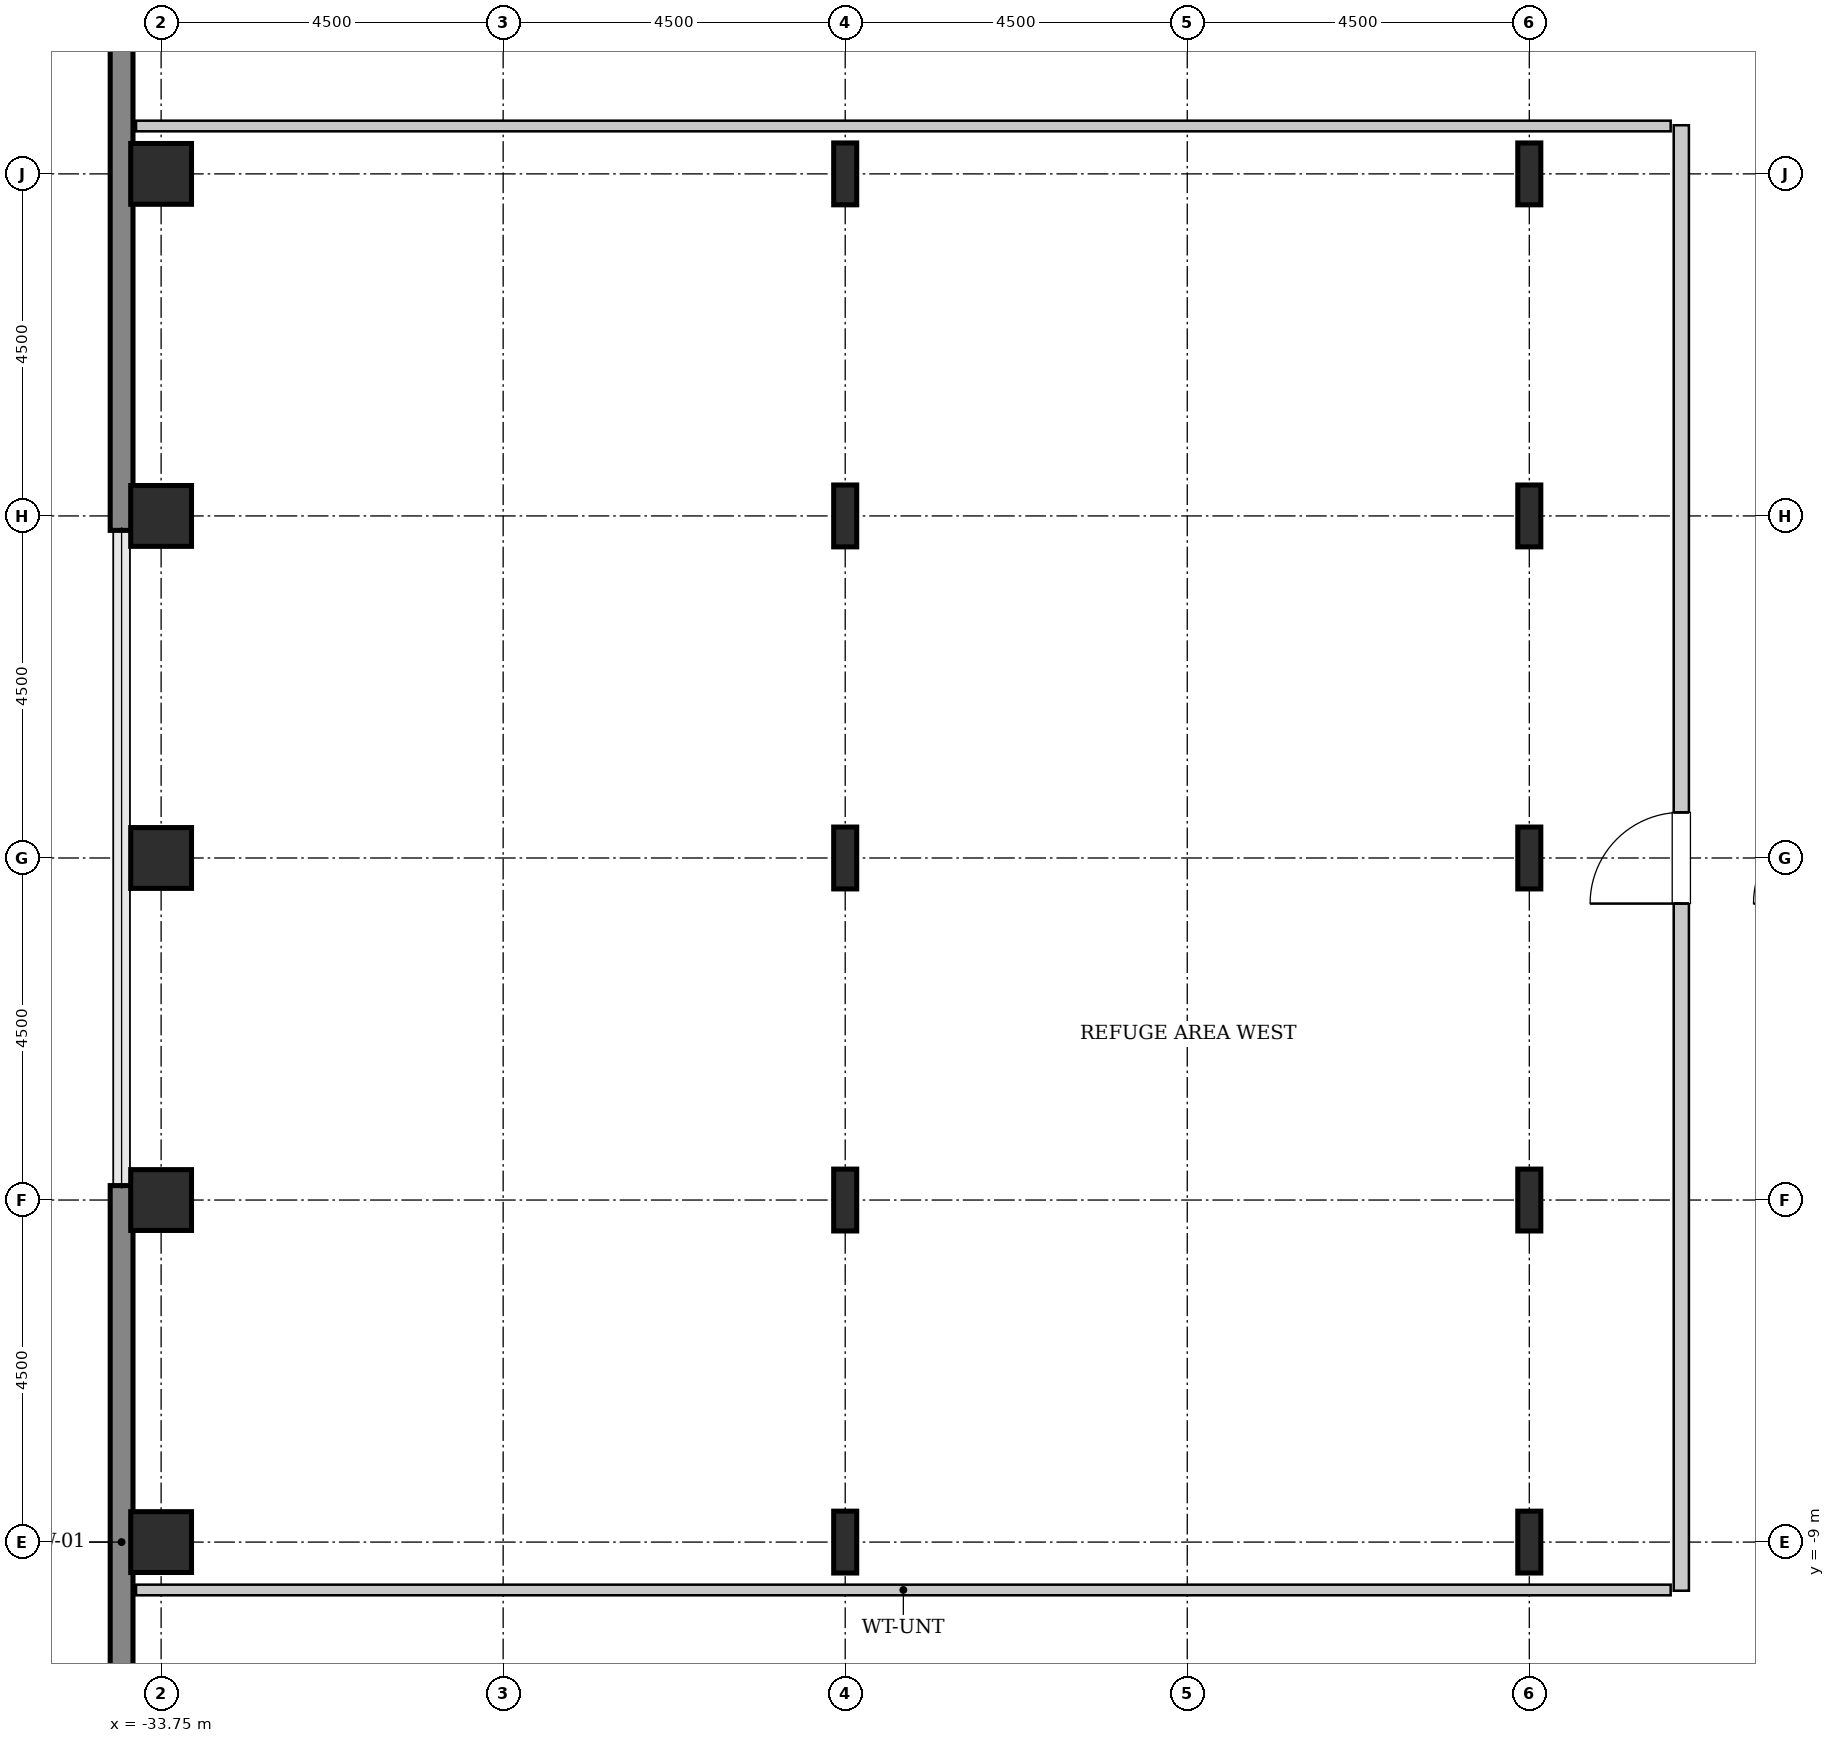
"""IFC4 building model, lengths in metres.
Left out: names, types, materials, properties, quantities, classifications, styles, units other than length and angle.
Written with IfcOpenShell. Run it as: python <this file> out.ifc"""

import sys

from ifc_helpers import new_model, si_unit, direction, frame, frame_2d, origin, origin_2d, place, context, subcontext, project, spatial, rectangle, hollow_rectangle, i_section, extrude, source, transform, mapped, element, fill, save


model = new_model("IFC4")
c1 = context("Model", 3, precision=1e-05, world=origin(), true_north=direction((0.0, 1.0)))
c2 = subcontext(c1, "Body", "Model", "MODEL_VIEW")
j1 = project(units=[si_unit("LENGTHUNIT", "METRE"), si_unit("PLANEANGLEUNIT", "RADIAN")], contexts=[c1])
p1 = place(None, origin())
s1 = spatial("IfcSite", under=j1, at=p1, CompositionType="ELEMENT")
p2 = place(p1, origin())
s2 = spatial("IfcBuilding", under=s1, at=p2, CompositionType="ELEMENT")
p3 = place(p2, frame((0.0, 0.0, 202.0)))
s3 = spatial("IfcBuildingStorey", under=s2, at=p3, CompositionType="ELEMENT", Elevation=202.0)
m1 = source(origin(), c2, "Body", "SweptSolid", [
    extrude(hollow_rectangle(XDim=0.8, YDim=0.8, WallThickness=0.04, InnerFilletRadius=0.04, OuterFilletRadius=0.08, at=origin_2d()), origin(), (0.0, 0.0, 1.0), 4.6),
])
for number, where, z_axis, x_axis in (
    (1, (-33.75, -9.0, 0.0), (0.0, 0.0, 1.0), (1.0, 0.0, 0.0)),
    (2, (-33.75, -4.5, 0.0), (0.0, 0.0, 1.0), (1.0, 0.0, 0.0)),
    (3, (-33.75, 0.0, 0.0), (0.0, 0.0, 1.0), (1.0, 0.0, 0.0)),
    (4, (-33.75, 4.5, 0.0), (0.0, 0.0, 1.0), (1.0, 0.0, 0.0)),
    (5, (-33.75, 9.0, 0.0), (0.0, 0.0, 1.0), (1.0, 0.0, 0.0)),
):
    element("IfcColumn", number, at=place(p3, frame(where, z_axis=z_axis, x_axis=x_axis)), inside=s3, PredefinedType="COLUMN", context=c2, shape_type="MappedRepresentation", body=[
        mapped(m1, transform((0.0, 0.0, 0.0), x_axis=(1.0, 0.0, 0.0), y_axis=(0.0, 1.0, 0.0), z_axis=(0.0, 0.0, 1.0), scale=1.0)),
    ])
m2 = source(origin(), c2, "Body", "SweptSolid", [
    extrude(i_section(OverallWidth=0.303, OverallDepth=0.814, WebThickness=0.021, FlangeThickness=0.04, FilletRadius=0.03, at=origin_2d()), origin(), (0.0, 0.0, 1.0), 4.6),
])
for number, where, z_axis, x_axis in (
    (6, (-24.75, -9.0, 0.0), (0.0, 0.0, 1.0), (1.0, 0.0, 0.0)),
    (7, (-24.75, -4.5, 0.0), (0.0, 0.0, 1.0), (1.0, 0.0, 0.0)),
    (8, (-24.75, 0.0, 0.0), (0.0, 0.0, 1.0), (1.0, 0.0, 0.0)),
    (9, (-24.75, 4.5, 0.0), (0.0, 0.0, 1.0), (1.0, 0.0, 0.0)),
    (10, (-24.75, 9.0, 0.0), (0.0, 0.0, 1.0), (1.0, 0.0, 0.0)),
    (11, (-15.75, -9.0, 0.0), (0.0, 0.0, 1.0), (1.0, 0.0, 0.0)),
    (12, (-15.75, -4.5, 0.0), (0.0, 0.0, 1.0), (1.0, 0.0, 0.0)),
    (13, (-15.75, 0.0, 0.0), (0.0, 0.0, 1.0), (1.0, 0.0, 0.0)),
    (14, (-15.75, 4.5, 0.0), (0.0, 0.0, 1.0), (1.0, 0.0, 0.0)),
    (15, (-15.75, 9.0, 0.0), (0.0, 0.0, 1.0), (1.0, 0.0, 0.0)),
):
    element("IfcColumn", number, at=place(p3, frame(where, z_axis=z_axis, x_axis=x_axis)), inside=s3, PredefinedType="COLUMN", context=c2, shape_type="MappedRepresentation", body=[
        mapped(m2, transform((0.0, 0.0, 0.0), x_axis=(1.0, 0.0, 0.0), y_axis=(0.0, 1.0, 0.0), z_axis=(0.0, 0.0, 1.0), scale=1.0)),
    ])
m3 = source(origin(), c2, "Body", "SweptSolid", [
    extrude(rectangle(XDim=9.38, YDim=0.3, at=frame_2d((4.69, 0.0))), origin(), (0.0, 0.0, 1.0), 4.35),
])
for number, where, z_axis, x_axis in (
    (16, (-34.27, -13.69, 0.0), (0.0, 0.0, 1.0), (0.0, 1.0, 0.0)),
    (17, (-34.27, 4.31, 0.0), (0.0, 0.0, 1.0), (0.0, 1.0, 0.0)),
):
    element("IfcWall", number, at=place(p3, frame(where, z_axis=z_axis, x_axis=x_axis)), inside=s3, PredefinedType="SHEAR", context=c2, shape_type="MappedRepresentation", body=[
        mapped(m3, transform((0.0, 0.0, 0.0), x_axis=(1.0, 0.0, 0.0), y_axis=(0.0, 1.0, 0.0), z_axis=(0.0, 0.0, 1.0), scale=1.0)),
    ])
m4 = source(origin(), c2, "Body", "SweptSolid", [
    extrude(rectangle(XDim=19.28, YDim=0.2, at=frame_2d((9.64, 0.0))), origin(), (0.0, 0.0, 1.0), 4.335),
])
p4 = place(p3, frame((-13.75, -9.64, 0.0), z_axis=(0.0, 0.0, 1.0), x_axis=(0.0, 1.0, 0.0)))
e18 = element("IfcWall", 18, at=p4, inside=s3, PredefinedType="SOLIDWALL", context=c2, shape_type="MappedRepresentation", body=[
    mapped(m4, transform((0.0, 0.0, 0.0), x_axis=(1.0, 0.0, 0.0), y_axis=(0.0, 1.0, 0.0), z_axis=(0.0, 0.0, 1.0), scale=1.0)),
])
p5 = place(p4, frame((9.04, 0.0, 0.0)))
e19 = element("IfcOpeningElement", 19, at=p5, cuts=e18, PredefinedType="OPENING", context=c2, shape_type="SweptSolid", body=[
    extrude(rectangle(XDim=1.2, YDim=2.15, at=frame_2d((0.6, 1.075))), frame((0.0, 0.11, 0.0), z_axis=(0.0, -1.0, 0.0), x_axis=(1.0, 0.0, 0.0)), (0.0, 0.0, 1.0), 0.22),
])
m5 = source(origin(), c2, "Body", "SweptSolid", [
    extrude(rectangle(XDim=20.19, YDim=0.14, at=frame_2d((10.095, 0.0))), origin(), (0.0, 0.0, 1.0), 4.335),
])
for number, where, z_axis, x_axis in (
    (20, (-34.08, -9.63, 0.0), (0.0, 0.0, 1.0), (1.0, 0.0, 0.0)),
    (21, (-34.08, 9.63, 0.0), (0.0, 0.0, 1.0), (1.0, 0.0, 0.0)),
):
    element("IfcWall", number, at=place(p3, frame(where, z_axis=z_axis, x_axis=x_axis)), inside=s3, PredefinedType="PARTITIONING", context=c2, shape_type="MappedRepresentation", body=[
        mapped(m5, transform((0.0, 0.0, 0.0), x_axis=(1.0, 0.0, 0.0), y_axis=(0.0, 1.0, 0.0), z_axis=(0.0, 0.0, 1.0), scale=1.0)),
    ])
m6 = source(origin(), c2, "Body", "SweptSolid", [
    extrude(rectangle(XDim=1.2, YDim=2.15, at=frame_2d((0.6, 1.075))), frame((0.0, 0.025, 0.0), z_axis=(0.0, -1.0, 0.0), x_axis=(1.0, 0.0, 0.0)), (0.0, 0.0, 1.0), 0.05),
])
p6 = place(p5, origin())
e22 = element("IfcDoor", 22, at=p6, inside=s3, OperationType="SINGLE_SWING_LEFT", PredefinedType="DOOR", context=c2, shape_type="MappedRepresentation", body=[
    mapped(m6, transform((0.0, 0.0, 0.0), x_axis=(1.0, 0.0, 0.0), y_axis=(0.0, 1.0, 0.0), z_axis=(0.0, 0.0, 1.0), scale=1.0)),
])
fill(e19, e22)
save(model, sys.argv[1])
